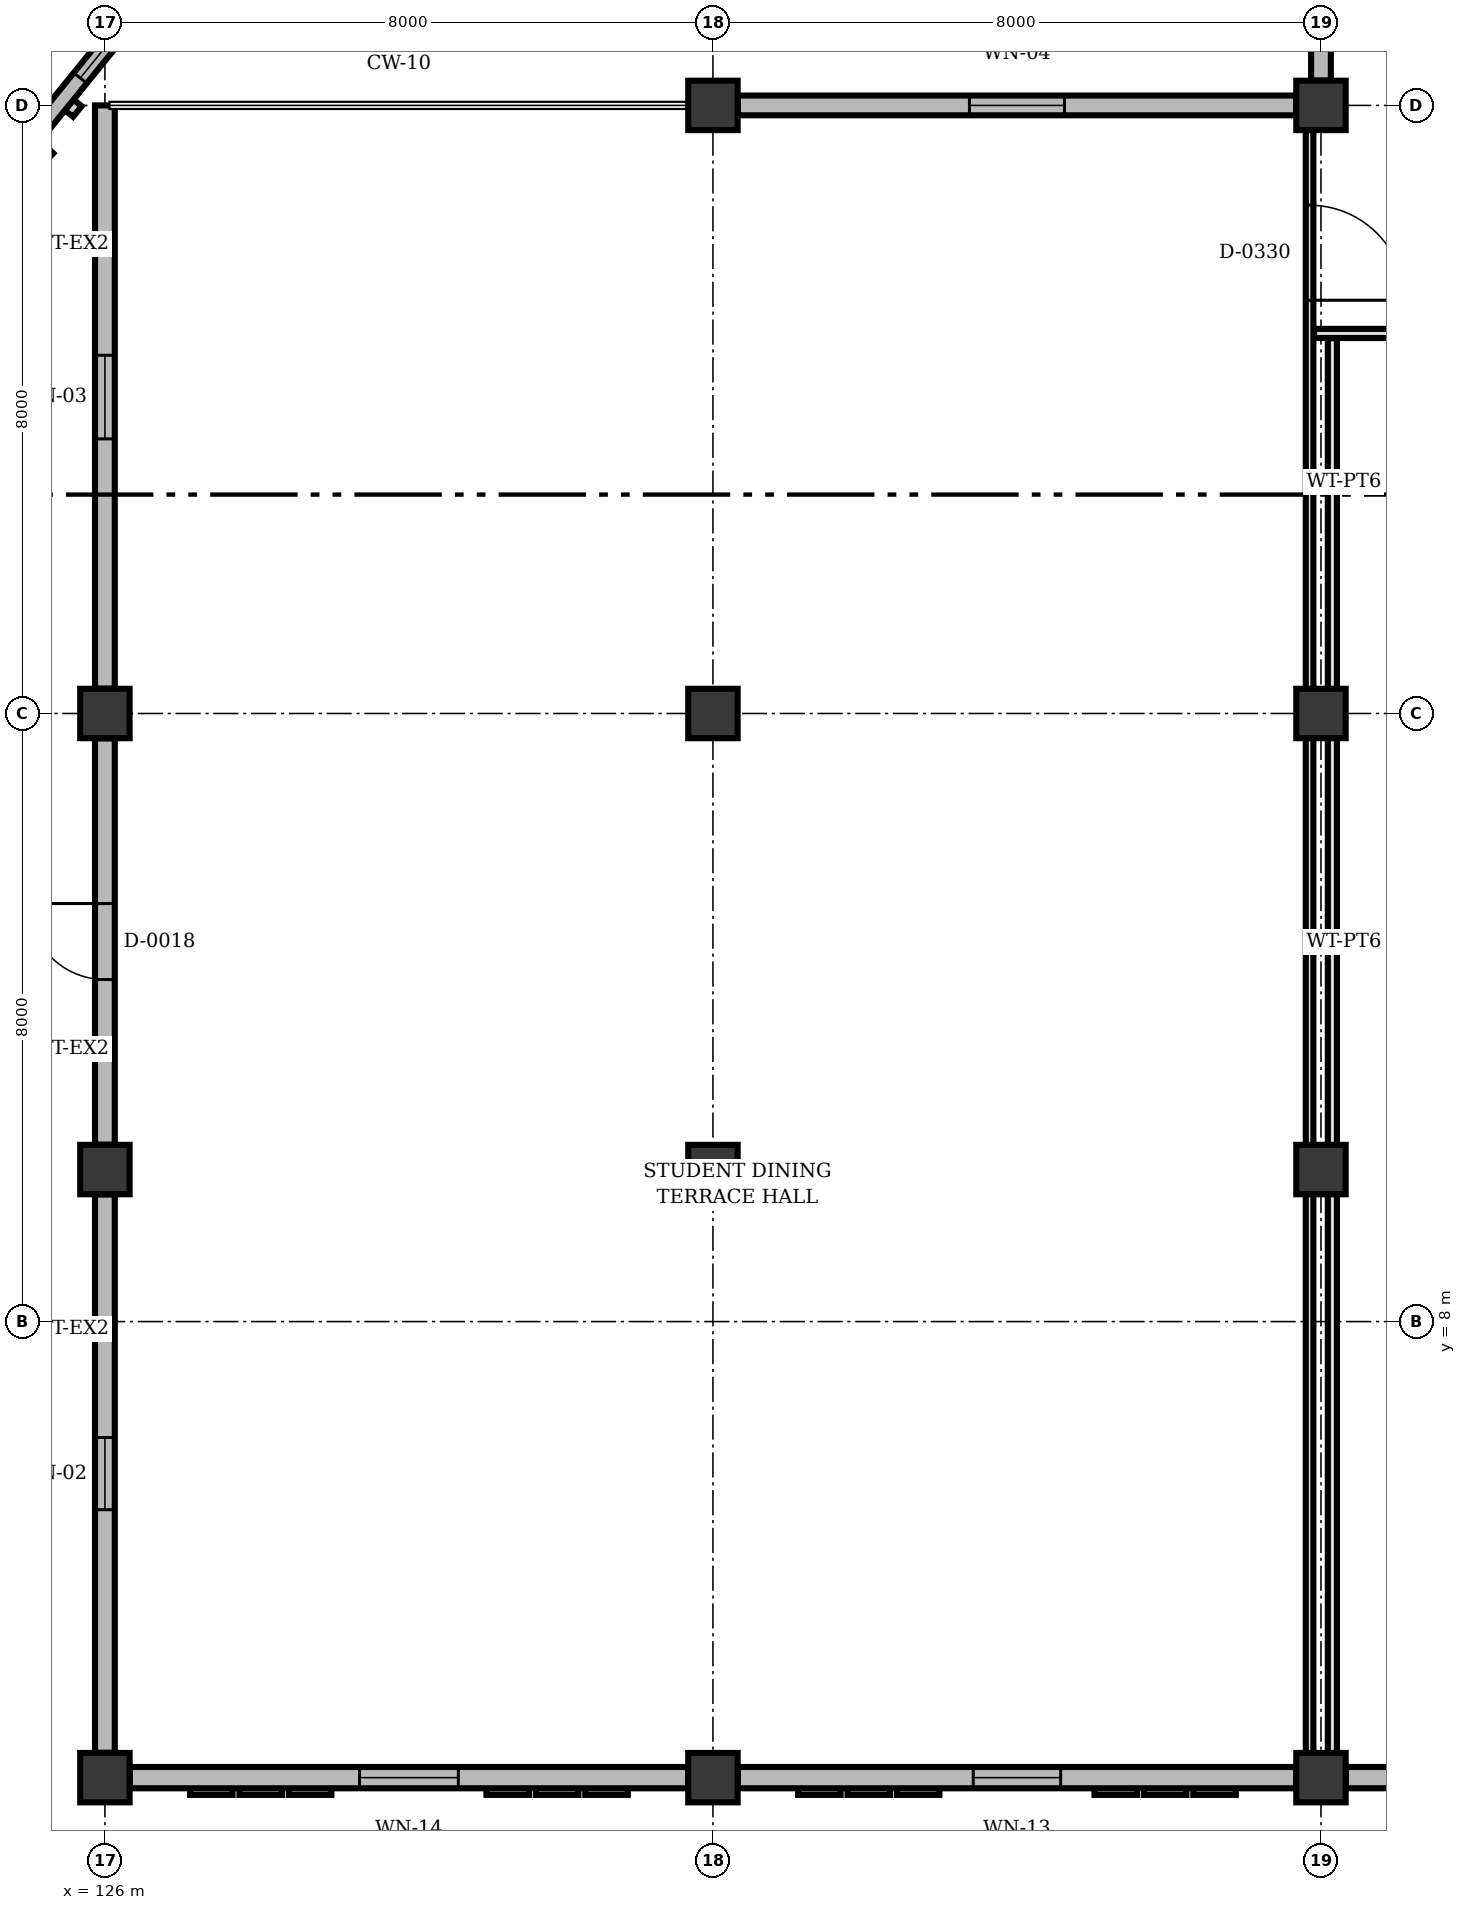
"""IFC4 building model, lengths in metres.
Left out: names, types, materials, properties, quantities, classifications, styles, units other than length and angle.
Written with IfcOpenShell. Run it as: python <this file> out.ifc"""

import sys

from ifc_helpers import new_model, si_unit, direction, frame, frame_2d, origin, origin_2d, place, context, subcontext, project, spatial, rectangle, extrude, element, fill, save


model = new_model("IFC4")
c1 = context("Model", 3, precision=1e-05, world=origin(), true_north=direction((0.0, 1.0)))
c2 = subcontext(c1, "Body", "Model", "MODEL_VIEW")
j1 = project(units=[si_unit("LENGTHUNIT", "METRE"), si_unit("PLANEANGLEUNIT", "RADIAN")], contexts=[c1])
p1 = place(None, origin())
s1 = spatial("IfcSite", under=j1, at=p1, CompositionType="ELEMENT")
p2 = place(p1, origin())
s2 = spatial("IfcBuilding", under=s1, at=p2, CompositionType="ELEMENT")
p3 = place(p2, origin())
s3 = spatial("IfcBuildingStorey", under=s2, at=p3, CompositionType="ELEMENT", Elevation=0.0)
for number, where, z_axis, x_axis in (
    (1, (124.862, 23.356, 0.0), (0.0, 0.0, 1.0), (0.728, -0.685, 0.0)),
    (2, (126.0, 10.0, 0.0), (0.0, 0.0, 1.0), (1.0, 0.0, 0.0)),
    (3, (126.0, 16.0, 0.0), (0.0, 0.0, 1.0), (1.0, 0.0, 0.0)),
    (4, (126.0, 2.0, 0.0), (0.0, 0.0, 1.0), (1.0, 0.0, 0.0)),
    (5, (134.0, 10.0, 0.0), (0.0, 0.0, 1.0), (1.0, 0.0, 0.0)),
    (6, (134.0, 16.0, 0.0), (0.0, 0.0, 1.0), (1.0, 0.0, 0.0)),
    (7, (134.0, 2.0, 0.0), (0.0, 0.0, 1.0), (1.0, 0.0, 0.0)),
    (8, (134.0, 24.0, 0.0), (0.0, 0.0, 1.0), (1.0, 0.0, 0.0)),
    (9, (142.0, 10.0, 0.0), (0.0, 0.0, 1.0), (1.0, 0.0, 0.0)),
    (10, (142.0, 16.0, 0.0), (0.0, 0.0, 1.0), (1.0, 0.0, 0.0)),
    (11, (142.0, 2.0, 0.0), (0.0, 0.0, 1.0), (1.0, 0.0, 0.0)),
    (12, (142.0, 24.0, 0.0), (0.0, 0.0, 1.0), (1.0, 0.0, 0.0)),
):
    element("IfcColumn", number, at=place(p3, frame(where, z_axis=z_axis, x_axis=x_axis)), inside=s3, PredefinedType="COLUMN", context=c2, shape_type="SweptSolid", body=[
        extrude(rectangle(XDim=0.65, YDim=0.65, at=origin_2d()), origin(), (0.0, 0.0, 1.0), 4.5),
    ])
p4 = place(p3, frame((129.5, 29.08, 0.0), z_axis=(0.0, 0.0, 1.0), x_axis=(-0.629497848331, -0.777002225831, 0.0)))
e13 = element("IfcWall", 13, at=p4, inside=s3, PredefinedType="SOLIDWALL", context=c2, shape_type="SweptSolid", body=[
    extrude(rectangle(XDim=7.031, YDim=0.22, at=frame_2d((3.516, 0.0))), origin(), (0.0, 0.0, 1.0), 3.55),
])
p5 = place(p4, frame((0.956, 0.0, 0.85)))
e14 = element("IfcOpeningElement", 14, at=p5, cuts=e13, PredefinedType="OPENING", context=c2, shape_type="SweptSolid", body=[
    extrude(rectangle(XDim=0.9, YDim=1.4, at=frame_2d((0.45, 0.7))), frame((0.0, 0.12, 0.0), z_axis=(0.0, -1.0, 0.0), x_axis=(1.0, 0.0, 0.0)), (0.0, 0.0, 1.0), 0.24),
])
p6 = place(p4, frame((2.362, 0.0, 0.85)))
e15 = element("IfcOpeningElement", 15, at=p6, cuts=e13, PredefinedType="OPENING", context=c2, shape_type="SweptSolid", body=[
    extrude(rectangle(XDim=0.9, YDim=1.4, at=frame_2d((0.45, 0.7))), frame((0.0, 0.12, 0.0), z_axis=(0.0, -1.0, 0.0), x_axis=(1.0, 0.0, 0.0)), (0.0, 0.0, 1.0), 0.24),
])
p7 = place(p4, frame((3.769, 0.0, 0.85)))
e16 = element("IfcOpeningElement", 16, at=p7, cuts=e13, PredefinedType="OPENING", context=c2, shape_type="SweptSolid", body=[
    extrude(rectangle(XDim=0.9, YDim=1.4, at=frame_2d((0.45, 0.7))), frame((0.0, 0.12, 0.0), z_axis=(0.0, -1.0, 0.0), x_axis=(1.0, 0.0, 0.0)), (0.0, 0.0, 1.0), 0.24),
])
p8 = place(p4, frame((5.175, 0.0, 0.85)))
e17 = element("IfcOpeningElement", 17, at=p8, cuts=e13, PredefinedType="OPENING", context=c2, shape_type="SweptSolid", body=[
    extrude(rectangle(XDim=0.9, YDim=1.4, at=frame_2d((0.45, 0.7))), frame((0.0, 0.12, 0.0), z_axis=(0.0, -1.0, 0.0), x_axis=(1.0, 0.0, 0.0)), (0.0, 0.0, 1.0), 0.24),
])
p9 = place(p3, frame((126.0, 2.327, 0.0), z_axis=(0.0, 0.0, 1.0), x_axis=(0.0, 1.0, 0.0)))
e18 = element("IfcWall", 18, at=p9, inside=s3, PredefinedType="SOLIDWALL", context=c2, shape_type="SweptSolid", body=[
    extrude(rectangle(XDim=7.346, YDim=0.26, at=frame_2d((3.673, 0.0))), origin(), (0.0, 0.0, 1.0), 3.55),
])
p10 = place(p9, frame((3.198, 0.0, 0.9)))
e19 = element("IfcOpeningElement", 19, at=p10, cuts=e18, PredefinedType="OPENING", context=c2, shape_type="SweptSolid", body=[
    extrude(rectangle(XDim=0.95, YDim=1.1, at=frame_2d((0.475, 0.55))), frame((0.0, 0.14, 0.0), z_axis=(0.0, -1.0, 0.0), x_axis=(1.0, 0.0, 0.0)), (0.0, 0.0, 1.0), 0.28),
])
p11 = place(p3, frame((126.0, 10.327, 0.0), z_axis=(0.0, 0.0, 1.0), x_axis=(0.0, 1.0, 0.0)))
e20 = element("IfcWall", 20, at=p11, inside=s3, PredefinedType="SOLIDWALL", context=c2, shape_type="SweptSolid", body=[
    extrude(rectangle(XDim=5.346, YDim=0.26, at=frame_2d((2.673, 0.0))), origin(), (0.0, 0.0, 1.0), 3.55),
])
p12 = place(p11, frame((2.173, 0.0, 0.0)))
e21 = element("IfcOpeningElement", 21, at=p12, cuts=e20, PredefinedType="OPENING", context=c2, shape_type="SweptSolid", body=[
    extrude(rectangle(XDim=1.0, YDim=2.15, at=frame_2d((0.5, 1.075))), frame((0.0, 0.14, 0.0), z_axis=(0.0, -1.0, 0.0), x_axis=(1.0, 0.0, 0.0)), (0.0, 0.0, 1.0), 0.28),
])
p13 = place(p3, frame((126.0, 16.327, 0.0), z_axis=(0.0, 0.0, 1.0), x_axis=(0.0, 1.0, 0.0)))
e22 = element("IfcWall", 22, at=p13, inside=s3, PredefinedType="SOLIDWALL", context=c2, shape_type="SweptSolid", body=[
    extrude(rectangle(XDim=7.673, YDim=0.26, at=frame_2d((3.836, 0.0))), origin(), (0.0, 0.0, 1.0), 3.55),
])
p14 = place(p13, frame((3.286, 0.0, 0.9)))
e23 = element("IfcOpeningElement", 23, at=p14, cuts=e22, PredefinedType="OPENING", context=c2, shape_type="SweptSolid", body=[
    extrude(rectangle(XDim=1.1, YDim=1.1, at=frame_2d((0.55, 0.55))), frame((0.0, 0.14, 0.0), z_axis=(0.0, -1.0, 0.0), x_axis=(1.0, 0.0, 0.0)), (0.0, 0.0, 1.0), 0.28),
])
p15 = place(p3, frame((134.327, 24.0, 0.0), z_axis=(0.0, 0.0, 1.0), x_axis=(1.0, 0.0, 0.0)))
e24 = element("IfcWall", 24, at=p15, inside=s3, PredefinedType="SOLIDWALL", context=c2, shape_type="SweptSolid", body=[
    extrude(rectangle(XDim=7.346, YDim=0.26, at=frame_2d((3.673, 0.0))), origin(), (0.0, 0.0, 1.0), 3.55),
])
p16 = place(p15, frame((3.048, 0.0, 0.9)))
e25 = element("IfcOpeningElement", 25, at=p16, cuts=e24, PredefinedType="OPENING", context=c2, shape_type="SweptSolid", body=[
    extrude(rectangle(XDim=1.25, YDim=1.1, at=frame_2d((0.625, 0.55))), frame((0.0, 0.14, 0.0), z_axis=(0.0, -1.0, 0.0), x_axis=(1.0, 0.0, 0.0)), (0.0, 0.0, 1.0), 0.28),
])
p17 = place(p3, frame((142.0, 24.327, 0.0), z_axis=(0.0, 0.0, 1.0), x_axis=(0.0, 1.0, 0.0)))
e26 = element("IfcWall", 26, at=p17, inside=s3, PredefinedType="SOLIDWALL", context=c2, shape_type="SweptSolid", body=[
    extrude(rectangle(XDim=7.346, YDim=0.26, at=frame_2d((3.673, 0.0))), origin(), (0.0, 0.0, 1.0), 3.55),
])
p18 = place(p17, frame((3.048, 0.0, 0.9)))
e27 = element("IfcOpeningElement", 27, at=p18, cuts=e26, PredefinedType="OPENING", context=c2, shape_type="SweptSolid", body=[
    extrude(rectangle(XDim=1.25, YDim=1.1, at=frame_2d((0.625, 0.55))), frame((0.0, 0.14, 0.0), z_axis=(0.0, -1.0, 0.0), x_axis=(1.0, 0.0, 0.0)), (0.0, 0.0, 1.0), 0.28),
])
p19 = place(p3, frame((149.673, 2.0, 0.0), z_axis=(0.0, 0.0, 1.0), x_axis=(-1.0, 0.0, 0.0)))
e28 = element("IfcWall", 28, at=p19, inside=s3, PredefinedType="SOLIDWALL", context=c2, shape_type="SweptSolid", body=[
    extrude(rectangle(XDim=7.346, YDim=0.28, at=frame_2d((3.673, 0.0))), origin(), (0.0, 0.0, 1.0), 3.55),
])
p20 = place(p19, frame((3.173, 0.0, 0.9)))
e29 = element("IfcOpeningElement", 29, at=p20, cuts=e28, PredefinedType="OPENING", context=c2, shape_type="SweptSolid", body=[
    extrude(rectangle(XDim=1.0, YDim=1.25, at=frame_2d((0.5, 0.625))), frame((0.0, 0.15, 0.0), z_axis=(0.0, -1.0, 0.0), x_axis=(1.0, 0.0, 0.0)), (0.0, 0.0, 1.0), 0.3),
])
p21 = place(p3, frame((141.673, 2.0, 0.0), z_axis=(0.0, 0.0, 1.0), x_axis=(-1.0, 0.0, 0.0)))
e30 = element("IfcWall", 30, at=p21, inside=s3, PredefinedType="SOLIDWALL", context=c2, shape_type="SweptSolid", body=[
    extrude(rectangle(XDim=7.346, YDim=0.28, at=frame_2d((3.673, 0.0))), origin(), (0.0, 0.0, 1.0), 3.55),
])
p22 = place(p21, frame((3.098, 0.0, 0.9)))
e31 = element("IfcOpeningElement", 31, at=p22, cuts=e30, PredefinedType="OPENING", context=c2, shape_type="SweptSolid", body=[
    extrude(rectangle(XDim=1.15, YDim=1.25, at=frame_2d((0.575, 0.625))), frame((0.0, 0.15, 0.0), z_axis=(0.0, -1.0, 0.0), x_axis=(1.0, 0.0, 0.0)), (0.0, 0.0, 1.0), 0.3),
])
p23 = place(p3, frame((133.673, 2.0, 0.0), z_axis=(0.0, 0.0, 1.0), x_axis=(-1.0, 0.0, 0.0)))
e32 = element("IfcWall", 32, at=p23, inside=s3, PredefinedType="SOLIDWALL", context=c2, shape_type="SweptSolid", body=[
    extrude(rectangle(XDim=7.346, YDim=0.28, at=frame_2d((3.673, 0.0))), origin(), (0.0, 0.0, 1.0), 3.55),
])
p24 = place(p23, frame((3.023, 0.0, 0.9)))
e33 = element("IfcOpeningElement", 33, at=p24, cuts=e32, PredefinedType="OPENING", context=c2, shape_type="SweptSolid", body=[
    extrude(rectangle(XDim=1.3, YDim=1.25, at=frame_2d((0.65, 0.625))), frame((0.0, 0.15, 0.0), z_axis=(0.0, -1.0, 0.0), x_axis=(1.0, 0.0, 0.0)), (0.0, 0.0, 1.0), 0.3),
])
p25 = place(p3, frame((141.91, 21.0, 0.0), z_axis=(0.0, 0.0, 1.0), x_axis=(1.0, 0.0, 0.0)))
e34 = element("IfcWall", 34, at=p25, inside=s3, PredefinedType="PARTITIONING", context=c2, shape_type="SweptSolid", body=[
    extrude(rectangle(XDim=8.0, YDim=0.12, at=frame_2d((4.0, 0.0))), origin(), (0.0, 0.0, 1.0), 3.572),
])
p26 = place(p25, frame((3.425, 0.0, 0.0)))
e35 = element("IfcOpeningElement", 35, at=p26, cuts=e34, PredefinedType="OPENING", context=c2, shape_type="SweptSolid", body=[
    extrude(rectangle(XDim=1.15, YDim=2.2, at=frame_2d((0.575, 1.1))), frame((0.0, 0.07, 0.0), z_axis=(0.0, -1.0, 0.0), x_axis=(1.0, 0.0, 0.0)), (0.0, 0.0, 1.0), 0.14),
])
p27 = place(p3, frame((142.15, 2.317, 0.0), z_axis=(0.0, 0.0, 1.0), x_axis=(0.0, 1.0, 0.0)))
e36 = element("IfcWall", 36, at=p27, inside=s3, PredefinedType="PARTITIONING", context=c2, shape_type="SweptSolid", body=[
    extrude(rectangle(XDim=7.366, YDim=0.12, at=frame_2d((3.683, 0.0))), origin(), (0.0, 0.0, 1.0), 3.572),
])
p28 = place(p3, frame((142.15, 10.317, 0.0), z_axis=(0.0, 0.0, 1.0), x_axis=(0.0, 1.0, 0.0)))
e37 = element("IfcWall", 37, at=p28, inside=s3, PredefinedType="PARTITIONING", context=c2, shape_type="SweptSolid", body=[
    extrude(rectangle(XDim=5.366, YDim=0.12, at=frame_2d((2.683, 0.0))), origin(), (0.0, 0.0, 1.0), 3.572),
])
p29 = place(p3, frame((142.15, 16.317, 0.0), z_axis=(0.0, 0.0, 1.0), x_axis=(0.0, 1.0, 0.0)))
e38 = element("IfcWall", 38, at=p29, inside=s3, PredefinedType="PARTITIONING", context=c2, shape_type="SweptSolid", body=[
    extrude(rectangle(XDim=4.62, YDim=0.12, at=frame_2d((2.31, 0.0))), origin(), (0.0, 0.0, 1.0), 3.572),
])
p30 = place(p3, frame((141.85, 23.683, 0.0), z_axis=(0.0, 0.0, 1.0), x_axis=(0.0, -1.0, 0.0)))
e39 = element("IfcWall", 39, at=p30, inside=s3, PredefinedType="PARTITIONING", context=c2, shape_type="SweptSolid", body=[
    extrude(rectangle(XDim=7.366, YDim=0.1, at=frame_2d((3.683, 0.0))), origin(), (0.0, 0.0, 1.0), 3.572),
])
p31 = place(p30, frame((0.996, 0.0, 0.0)))
e40 = element("IfcOpeningElement", 40, at=p31, cuts=e39, PredefinedType="OPENING", context=c2, shape_type="SweptSolid", body=[
    extrude(rectangle(XDim=1.25, YDim=2.2, at=frame_2d((0.625, 1.1))), frame((0.0, 0.06, 0.0), z_axis=(0.0, -1.0, 0.0), x_axis=(1.0, 0.0, 0.0)), (0.0, 0.0, 1.0), 0.12),
])
p32 = place(p3, frame((141.85, 15.683, 0.0), z_axis=(0.0, 0.0, 1.0), x_axis=(0.0, -1.0, 0.0)))
e41 = element("IfcWall", 41, at=p32, inside=s3, PredefinedType="PARTITIONING", context=c2, shape_type="SweptSolid", body=[
    extrude(rectangle(XDim=5.366, YDim=0.1, at=frame_2d((2.683, 0.0))), origin(), (0.0, 0.0, 1.0), 3.572),
])
p33 = place(p3, frame((141.85, 9.683, 0.0), z_axis=(0.0, 0.0, 1.0), x_axis=(0.0, -1.0, 0.0)))
e42 = element("IfcWall", 42, at=p33, inside=s3, PredefinedType="PARTITIONING", context=c2, shape_type="SweptSolid", body=[
    extrude(rectangle(XDim=7.366, YDim=0.1, at=frame_2d((3.683, 0.0))), origin(), (0.0, 0.0, 1.0), 3.572),
])
p34 = place(p8, origin())
e43 = element("IfcWindow", 43, at=p34, inside=s3, PartitioningType="SINGLE_PANEL", PredefinedType="WINDOW", context=c2, shape_type="SweptSolid", body=[
    extrude(rectangle(XDim=0.9, YDim=1.4, at=frame_2d((0.45, 0.7))), frame((0.0, 0.03, 0.0), z_axis=(0.0, -1.0, 0.0), x_axis=(1.0, 0.0, 0.0)), (0.0, 0.0, 1.0), 0.06),
])
fill(e17, e43)
p35 = place(p10, origin())
e44 = element("IfcWindow", 44, at=p35, inside=s3, PartitioningType="SINGLE_PANEL", PredefinedType="WINDOW", context=c2, shape_type="SweptSolid", body=[
    extrude(rectangle(XDim=0.95, YDim=1.1, at=frame_2d((0.475, 0.55))), frame((0.0, 0.03, 0.0), z_axis=(0.0, -1.0, 0.0), x_axis=(1.0, 0.0, 0.0)), (0.0, 0.0, 1.0), 0.06),
])
fill(e19, e44)
p36 = place(p12, origin())
e45 = element("IfcDoor", 45, at=p36, inside=s3, OperationType="SINGLE_SWING_RIGHT", PredefinedType="DOOR", context=c2, shape_type="SweptSolid", body=[
    extrude(rectangle(XDim=1.0, YDim=2.15, at=frame_2d((0.5, 1.075))), frame((0.0, 0.025, 0.0), z_axis=(0.0, -1.0, 0.0), x_axis=(1.0, 0.0, 0.0)), (0.0, 0.0, 1.0), 0.05),
])
fill(e21, e45)
p37 = place(p14, origin())
e46 = element("IfcWindow", 46, at=p37, inside=s3, PartitioningType="SINGLE_PANEL", PredefinedType="WINDOW", context=c2, shape_type="SweptSolid", body=[
    extrude(rectangle(XDim=1.1, YDim=1.1, at=frame_2d((0.55, 0.55))), frame((0.0, 0.03, 0.0), z_axis=(0.0, -1.0, 0.0), x_axis=(1.0, 0.0, 0.0)), (0.0, 0.0, 1.0), 0.06),
])
fill(e23, e46)
p38 = place(p16, origin())
e47 = element("IfcWindow", 47, at=p38, inside=s3, PartitioningType="SINGLE_PANEL", PredefinedType="WINDOW", context=c2, shape_type="SweptSolid", body=[
    extrude(rectangle(XDim=1.25, YDim=1.1, at=frame_2d((0.625, 0.55))), frame((0.0, 0.03, 0.0), z_axis=(0.0, -1.0, 0.0), x_axis=(1.0, 0.0, 0.0)), (0.0, 0.0, 1.0), 0.06),
])
fill(e25, e47)
p39 = place(p22, origin())
e48 = element("IfcWindow", 48, at=p39, inside=s3, PartitioningType="SINGLE_PANEL", PredefinedType="WINDOW", context=c2, shape_type="SweptSolid", body=[
    extrude(rectangle(XDim=1.15, YDim=1.25, at=frame_2d((0.575, 0.625))), frame((0.0, 0.03, 0.0), z_axis=(0.0, -1.0, 0.0), x_axis=(1.0, 0.0, 0.0)), (0.0, 0.0, 1.0), 0.06),
])
fill(e31, e48)
p40 = place(p24, origin())
e49 = element("IfcWindow", 49, at=p40, inside=s3, PartitioningType="SINGLE_PANEL", PredefinedType="WINDOW", context=c2, shape_type="SweptSolid", body=[
    extrude(rectangle(XDim=1.3, YDim=1.25, at=frame_2d((0.65, 0.625))), frame((0.0, 0.03, 0.0), z_axis=(0.0, -1.0, 0.0), x_axis=(1.0, 0.0, 0.0)), (0.0, 0.0, 1.0), 0.06),
])
fill(e33, e49)
p41 = place(p31, origin())
e50 = element("IfcDoor", 50, at=p41, inside=s3, OperationType="SINGLE_SWING_RIGHT", PredefinedType="DOOR", context=c2, shape_type="SweptSolid", body=[
    extrude(rectangle(XDim=1.25, YDim=2.2, at=frame_2d((0.625, 1.1))), frame((0.0, 0.025, 0.0), z_axis=(0.0, -1.0, 0.0), x_axis=(1.0, 0.0, 0.0)), (0.0, 0.0, 1.0), 0.05),
])
fill(e40, e50)
save(model, sys.argv[1])
